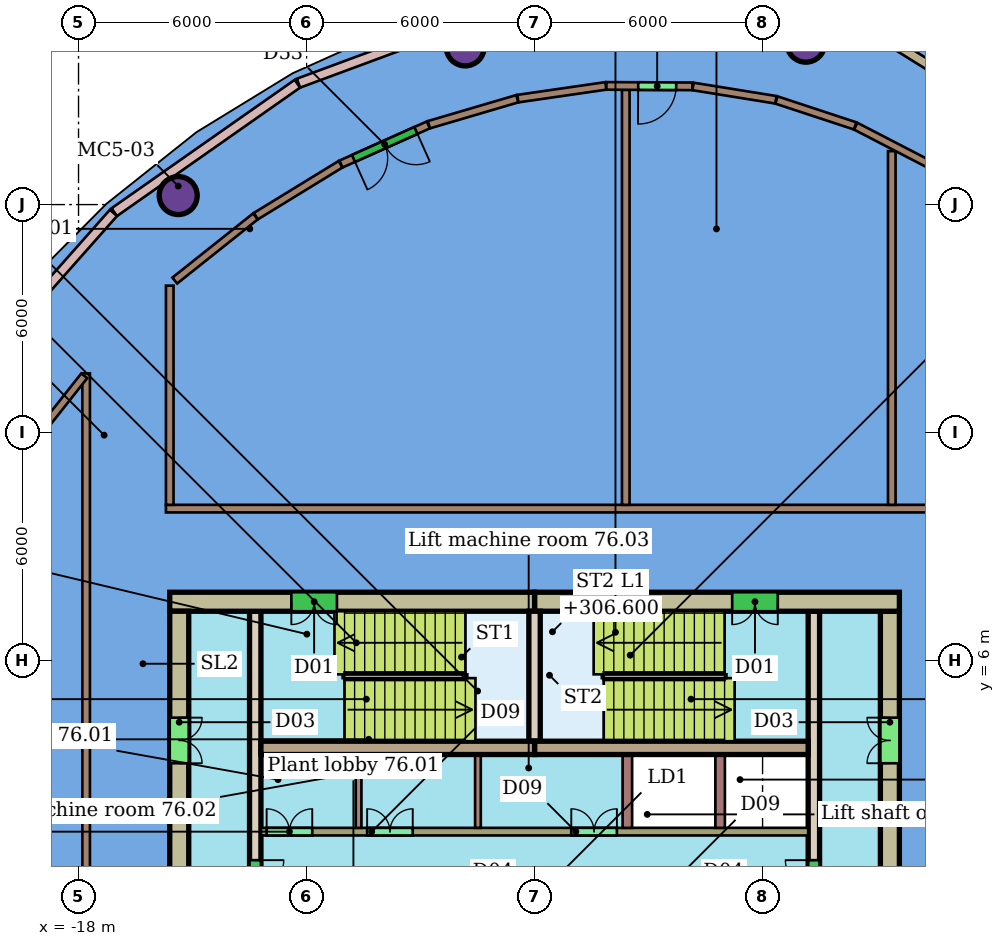
"""IFC4 building model, lengths in metres.
Left out: names, types, materials, properties, quantities, classifications, styles, units other than length and angle.
Written with IfcOpenShell. Run it as: python <this file> out.ifc"""

import sys

from ifc_helpers import new_model, si_unit, direction, frame, frame_2d, origin, origin_2d, place, context, subcontext, project, spatial, rectangle, hollow_circle, extrude, element, fill, save


model = new_model("IFC4")
c1 = context("Model", 3, precision=1e-05, world=origin(), true_north=direction((0.0, 1.0)))
c2 = subcontext(c1, "Body", "Model", "MODEL_VIEW")
j1 = project(units=[si_unit("LENGTHUNIT", "METRE"), si_unit("PLANEANGLEUNIT", "RADIAN")], contexts=[c1])
p1 = place(None, origin())
s1 = spatial("IfcSite", under=j1, at=p1, CompositionType="ELEMENT")
p2 = place(p1, origin())
s2 = spatial("IfcBuilding", under=s1, at=p2, CompositionType="ELEMENT")
p3 = place(p2, frame((0.0, 0.0, 304.5)))
s3 = spatial("IfcBuildingStorey", under=s2, at=p3, CompositionType="ELEMENT", Elevation=304.5)
for number, where, z_axis, x_axis in (
    (1, (1.138, 22.247, 0.0), (0.0, 0.0, 1.0), (1.0, 0.0, 0.0)),
    (2, (-7.825, 22.149, 0.0), (0.0, 0.0, 1.0), (1.0, 0.0, 0.0)),
    (3, (-15.377, 18.238, 0.0), (0.0, 0.0, 1.0), (1.0, 0.0, 0.0)),
):
    element("IfcColumn", number, at=place(p3, frame(where, z_axis=z_axis, x_axis=x_axis)), inside=s3, PredefinedType="COLUMN", context=c2, shape_type="SweptSolid", body=[
        extrude(hollow_circle(Radius=0.5, WallThickness=0.04, at=origin_2d()), origin(), (0.0, 0.0, 1.0), 4.0),
    ])
p4 = place(p3, frame((-15.7, 10.0, 0.0), z_axis=(0.0, 0.0, 1.0), x_axis=(1.0, 0.0, 0.0)))
e4 = element("IfcWall", 4, at=p4, inside=s3, PredefinedType="PARTITIONING", context=c2, shape_type="SweptSolid", body=[
    extrude(rectangle(XDim=21.4, YDim=0.2, at=frame_2d((10.7, 0.0))), origin(), (0.0, 0.0, 1.0), 3.65),
])
p5 = place(p3, frame((-17.8, -10.1, 0.0), z_axis=(0.0, 0.0, 1.0), x_axis=(0.0, 1.0, 0.0)))
e5 = element("IfcWall", 5, at=p5, inside=s3, PredefinedType="PARTITIONING", context=c2, shape_type="SweptSolid", body=[
    extrude(rectangle(XDim=23.658, YDim=0.2, at=frame_2d((11.829, 0.0))), origin(), (0.0, 0.0, 1.0), 3.65),
])
p6 = place(p3, frame((-15.6, 10.1, 0.0), z_axis=(0.0, 0.0, 1.0), x_axis=(0.0, 1.0, 0.0)))
e6 = element("IfcWall", 6, at=p6, inside=s3, PredefinedType="PARTITIONING", context=c2, shape_type="SweptSolid", body=[
    extrude(rectangle(XDim=5.767, YDim=0.2, at=frame_2d((2.884, 0.0))), origin(), (0.0, 0.0, 1.0), 3.65),
])
p7 = place(p3, frame((-3.6, 10.1, 0.0), z_axis=(0.0, 0.0, 1.0), x_axis=(0.0, 1.0, 0.0)))
e7 = element("IfcWall", 7, at=p7, inside=s3, PredefinedType="PARTITIONING", context=c2, shape_type="SweptSolid", body=[
    extrude(rectangle(XDim=10.92, YDim=0.2, at=frame_2d((5.46, 0.0))), origin(), (0.0, 0.0, 1.0), 3.65),
])
p8 = place(p3, frame((-15.468, 16.001, 0.0), z_axis=(0.0, 0.0, 1.0), x_axis=(0.782665833332, 0.62244212047, 0.0)))
e8 = element("IfcWall", 8, at=p8, inside=s3, PredefinedType="PARTITIONING", context=c2, shape_type="SweptSolid", body=[
    extrude(rectangle(XDim=2.712, YDim=0.2, at=frame_2d((1.356, 0.0))), origin(), (0.0, 0.0, 1.0), 3.65),
])
p9 = place(p3, frame((-13.334, 17.696, 0.0), z_axis=(0.0, 0.0, 1.0), x_axis=(0.852667029926, 0.522454721557, 0.0)))
e9 = element("IfcWall", 9, at=p9, inside=s3, PredefinedType="PARTITIONING", context=c2, shape_type="SweptSolid", body=[
    extrude(rectangle(XDim=2.614, YDim=0.2, at=frame_2d((1.307, 0.0))), origin(), (0.0, 0.0, 1.0), 3.65),
])
p10 = place(p3, frame((-8.794, 20.097, 0.0), z_axis=(0.0, 0.0, 1.0), x_axis=(-0.912552955942, -0.408958558538, 0.0)))
e10 = element("IfcWall", 10, at=p10, inside=s3, PredefinedType="PARTITIONING", context=c2, shape_type="SweptSolid", body=[
    extrude(rectangle(XDim=2.521, YDim=0.2, at=frame_2d((1.26, 0.0))), origin(), (0.0, 0.0, 1.0), 3.65),
])
p11 = place(p10, frame((0.36, 0.0, 0.0)))
e11 = element("IfcOpeningElement", 11, at=p11, cuts=e10, PredefinedType="OPENING", context=c2, shape_type="SweptSolid", body=[
    extrude(rectangle(XDim=1.8, YDim=2.4, at=frame_2d((0.9, 1.2))), frame((0.0, 0.11, 0.0), z_axis=(0.0, -1.0, 0.0), x_axis=(1.0, 0.0, 0.0)), (0.0, 0.0, 1.0), 0.22),
])
p12 = place(p3, frame((-8.781, 20.101, 0.0), z_axis=(0.0, 0.0, 1.0), x_axis=(0.95934146389, 0.28224803925, 0.0)))
e12 = element("IfcWall", 12, at=p12, inside=s3, PredefinedType="PARTITIONING", context=c2, shape_type="SweptSolid", body=[
    extrude(rectangle(XDim=2.426, YDim=0.2, at=frame_2d((1.213, 0.0))), origin(), (0.0, 0.0, 1.0), 3.65),
])
p13 = place(p3, frame((-6.439, 20.788, 0.0), z_axis=(0.0, 0.0, 1.0), x_axis=(0.989671979467, 0.143350525141, 0.0)))
e13 = element("IfcWall", 13, at=p13, inside=s3, PredefinedType="PARTITIONING", context=c2, shape_type="SweptSolid", body=[
    extrude(rectangle(XDim=2.338, YDim=0.2, at=frame_2d((1.169, 0.0))), origin(), (0.0, 0.0, 1.0), 3.65),
])
p14 = place(p3, frame((-1.846, 21.111, 0.0), z_axis=(0.0, 0.0, 1.0), x_axis=(-0.999986603133, 0.005176248997, 0.0)))
e14 = element("IfcWall", 14, at=p14, inside=s3, PredefinedType="PARTITIONING", context=c2, shape_type="SweptSolid", body=[
    extrude(rectangle(XDim=2.264, YDim=0.2, at=frame_2d((1.132, 0.0))), origin(), (0.0, 0.0, 1.0), 3.65),
])
p15 = place(p14, frame((0.427, 0.0, 0.0)))
e15 = element("IfcOpeningElement", 15, at=p15, cuts=e14, PredefinedType="OPENING", context=c2, shape_type="SweptSolid", body=[
    extrude(rectangle(XDim=1.0, YDim=2.1, at=frame_2d((0.5, 1.05))), frame((0.0, 0.11, 0.0), z_axis=(0.0, -1.0, 0.0), x_axis=(1.0, 0.0, 0.0)), (0.0, 0.0, 1.0), 0.22),
])
p16 = place(p3, frame((3.4, 10.1, 0.0), z_axis=(0.0, 0.0, 1.0), x_axis=(0.0, 1.0, 0.0)))
e16 = element("IfcWall", 16, at=p16, inside=s3, PredefinedType="PARTITIONING", context=c2, shape_type="SweptSolid", body=[
    extrude(rectangle(XDim=9.307, YDim=0.2, at=frame_2d((4.654, 0.0))), origin(), (0.0, 0.0, 1.0), 3.65),
])
p17 = place(p3, frame((-1.831, 21.109, 0.0), z_axis=(0.0, 0.0, 1.0), x_axis=(0.987257926423, -0.159128208423, 0.0)))
e17 = element("IfcWall", 17, at=p17, inside=s3, PredefinedType="PARTITIONING", context=c2, shape_type="SweptSolid", body=[
    extrude(rectangle(XDim=2.209, YDim=0.2, at=frame_2d((1.104, 0.0))), origin(), (0.0, 0.0, 1.0), 3.65),
])
p18 = place(p3, frame((0.365, 20.752, 0.0), z_axis=(0.0, 0.0, 1.0), x_axis=(0.949852302688, -0.312698901627, 0.0)))
e18 = element("IfcWall", 18, at=p18, inside=s3, PredefinedType="PARTITIONING", context=c2, shape_type="SweptSolid", body=[
    extrude(rectangle(XDim=2.181, YDim=0.2, at=frame_2d((1.09, 0.0))), origin(), (0.0, 0.0, 1.0), 3.65),
])
p19 = place(p3, frame((2.451, 20.063, 0.0), z_axis=(0.0, 0.0, 1.0), x_axis=(0.888068415533, -0.45971131086, 0.0)))
e19 = element("IfcWall", 19, at=p19, inside=s3, PredefinedType="PARTITIONING", context=c2, shape_type="SweptSolid", body=[
    extrude(rectangle(XDim=2.165, YDim=0.2, at=frame_2d((1.082, 0.0))), origin(), (0.0, 0.0, 1.0), 3.65),
])
p20 = place(p3, frame((-19.191, 11.799, 0.0), z_axis=(0.0, 0.0, 1.0), x_axis=(0.620321195124, 0.784347891487, 0.0)))
e20 = element("IfcWall", 20, at=p20, inside=s3, PredefinedType="PARTITIONING", context=c2, shape_type="SweptSolid", body=[
    extrude(rectangle(XDim=2.163, YDim=0.2, at=frame_2d((1.081, 0.0))), origin(), (0.0, 0.0, 1.0), 3.65),
])
p21 = place(p3, frame((-6.983, 23.131, 0.0), z_axis=(0.0, 0.0, 1.0), x_axis=(-0.937764073403, -0.34727300879, 0.0)))
e21 = element("IfcWall", 21, at=p21, inside=s3, PredefinedType="SOLIDWALL", context=c2, shape_type="SweptSolid", body=[
    extrude(rectangle(XDim=5.577, YDim=0.25, at=frame_2d((2.789, 0.0))), origin(), (0.0, 0.0, 1.0), 3.7),
])
p22 = place(p3, frame((-12.241, 21.18, 0.0), z_axis=(0.0, 0.0, 1.0), x_axis=(-0.818761962214, -0.574133128492, 0.0)))
e22 = element("IfcWall", 22, at=p22, inside=s3, PredefinedType="SOLIDWALL", context=c2, shape_type="SweptSolid", body=[
    extrude(rectangle(XDim=5.885, YDim=0.25, at=frame_2d((2.943, 0.0))), origin(), (0.0, 0.0, 1.0), 3.7),
])
p23 = place(p3, frame((-17.081, 17.781, 0.0), z_axis=(0.0, 0.0, 1.0), x_axis=(-0.663232601491, -0.748413332537, 0.0)))
e23 = element("IfcWall", 23, at=p23, inside=s3, PredefinedType="SOLIDWALL", context=c2, shape_type="SweptSolid", body=[
    extrude(rectangle(XDim=6.139, YDim=0.25, at=frame_2d((3.07, 0.0))), origin(), (0.0, 0.0, 1.0), 3.7),
])
p24 = place(p3, frame((7.737, 19.57, 0.0), z_axis=(0.0, 0.0, 1.0), x_axis=(-0.84872546146, 0.528833708333, 0.0)))
e24 = element("IfcWall", 24, at=p24, inside=s3, PredefinedType="SOLIDWALL", context=c2, shape_type="SweptSolid", body=[
    extrude(rectangle(XDim=5.125, YDim=0.25, at=frame_2d((2.562, 0.0))), origin(), (0.0, 0.0, 1.0), 4.0),
])
p25 = place(p3, frame((3.6, 7.55, 0.0), z_axis=(0.0, 0.0, 1.0), x_axis=(-1.0, 0.0, 0.0)))
e25 = element("IfcWall", 25, at=p25, inside=s3, PredefinedType="SHEAR", context=c2, shape_type="SweptSolid", body=[
    extrude(rectangle(XDim=9.6, YDim=0.5, at=frame_2d((4.8, 0.0))), origin(), (0.0, 0.0, 1.0), 3.9),
])
p26 = place(p25, frame((3.2, 0.0, 0.0)))
e26 = element("IfcOpeningElement", 26, at=p26, cuts=e25, PredefinedType="OPENING", context=c2, shape_type="SweptSolid", body=[
    extrude(rectangle(XDim=1.2, YDim=2.1, at=frame_2d((0.6, 1.05))), frame((0.0, 0.26, 0.0), z_axis=(0.0, -1.0, 0.0), x_axis=(1.0, 0.0, 0.0)), (0.0, 0.0, 1.0), 0.52),
])
p27 = place(p3, frame((-6.0, 7.55, 0.0), z_axis=(0.0, 0.0, 1.0), x_axis=(-1.0, 0.0, 0.0)))
e27 = element("IfcWall", 27, at=p27, inside=s3, PredefinedType="SHEAR", context=c2, shape_type="SweptSolid", body=[
    extrude(rectangle(XDim=9.6, YDim=0.5, at=frame_2d((4.8, 0.0))), origin(), (0.0, 0.0, 1.0), 3.9),
])
p28 = place(p27, frame((5.2, 0.0, 0.0)))
e28 = element("IfcOpeningElement", 28, at=p28, cuts=e27, PredefinedType="OPENING", context=c2, shape_type="SweptSolid", body=[
    extrude(rectangle(XDim=1.2, YDim=2.1, at=frame_2d((0.6, 1.05))), frame((0.0, 0.26, 0.0), z_axis=(0.0, -1.0, 0.0), x_axis=(1.0, 0.0, 0.0)), (0.0, 0.0, 1.0), 0.52),
])
p29 = place(p3, frame((-15.35, 7.3, 0.0), z_axis=(0.0, 0.0, 1.0), x_axis=(0.0, -1.0, 0.0)))
e29 = element("IfcWall", 29, at=p29, inside=s3, PredefinedType="SHEAR", context=c2, shape_type="SweptSolid", body=[
    extrude(rectangle(XDim=14.6, YDim=0.5, at=frame_2d((7.3, 0.0))), origin(), (0.0, 0.0, 1.0), 3.9),
])
p30 = place(p29, frame((10.6, 0.0, 0.0)))
e30 = element("IfcOpeningElement", 30, at=p30, cuts=e29, PredefinedType="OPENING", context=c2, shape_type="SweptSolid", body=[
    extrude(rectangle(XDim=1.2, YDim=2.1, at=frame_2d((0.6, 1.05))), frame((0.0, 0.26, 0.0), z_axis=(0.0, -1.0, 0.0), x_axis=(1.0, 0.0, 0.0)), (0.0, 0.0, 1.0), 0.52),
])
p31 = place(p29, frame((2.8, 0.0, 0.0)))
e31 = element("IfcOpeningElement", 31, at=p31, cuts=e29, PredefinedType="OPENING", context=c2, shape_type="SweptSolid", body=[
    extrude(rectangle(XDim=1.2, YDim=2.1, at=frame_2d((0.6, 1.05))), frame((0.0, 0.26, 0.0), z_axis=(0.0, -1.0, 0.0), x_axis=(1.0, 0.0, 0.0)), (0.0, 0.0, 1.0), 0.52),
])
p32 = place(p3, frame((3.35, -7.3, 0.0), z_axis=(0.0, 0.0, 1.0), x_axis=(0.0, 1.0, 0.0)))
e32 = element("IfcWall", 32, at=p32, inside=s3, PredefinedType="SHEAR", context=c2, shape_type="SweptSolid", body=[
    extrude(rectangle(XDim=14.6, YDim=0.5, at=frame_2d((7.3, 0.0))), origin(), (0.0, 0.0, 1.0), 3.9),
])
p33 = place(p32, frame((2.8, 0.0, 0.0)))
e33 = element("IfcOpeningElement", 33, at=p33, cuts=e32, PredefinedType="OPENING", context=c2, shape_type="SweptSolid", body=[
    extrude(rectangle(XDim=1.2, YDim=2.1, at=frame_2d((0.6, 1.05))), frame((0.0, 0.26, 0.0), z_axis=(0.0, -1.0, 0.0), x_axis=(1.0, 0.0, 0.0)), (0.0, 0.0, 1.0), 0.52),
])
p34 = place(p32, frame((10.6, 0.0, 0.0)))
e34 = element("IfcOpeningElement", 34, at=p34, cuts=e32, PredefinedType="OPENING", context=c2, shape_type="SweptSolid", body=[
    extrude(rectangle(XDim=1.2, YDim=2.1, at=frame_2d((0.6, 1.05))), frame((0.0, 0.26, 0.0), z_axis=(0.0, -1.0, 0.0), x_axis=(1.0, 0.0, 0.0)), (0.0, 0.0, 1.0), 0.52),
])
for number, where, z_axis, x_axis in (
    (35, (-13.2, 3.705, 0.0), (0.0, 0.0, 1.0), (1.0, 0.0, 0.0)),
    (36, (-6.0, 3.705, 0.0), (0.0, 0.0, 1.0), (1.0, 0.0, 0.0)),
):
    element("IfcWall", number, at=place(p3, frame(where, z_axis=z_axis, x_axis=x_axis)), inside=s3, PredefinedType="SHEAR", context=c2, shape_type="SweptSolid", body=[
        extrude(rectangle(XDim=7.2, YDim=0.35, at=frame_2d((3.6, 0.0))), origin(), (0.0, 0.0, 1.0), 3.9),
    ])
p35 = place(p3, frame((-13.35, 7.3, 0.0), z_axis=(0.0, 0.0, 1.0), x_axis=(0.0, -1.0, 0.0)))
e37 = element("IfcWall", 37, at=p35, inside=s3, PredefinedType="SHEAR", context=c2, shape_type="SweptSolid", body=[
    extrude(rectangle(XDim=14.6, YDim=0.3, at=frame_2d((7.3, 0.0))), origin(), (0.0, 0.0, 1.0), 3.9),
])
p36 = place(p35, frame((6.55, 0.0, 0.0)))
e38 = element("IfcOpeningElement", 38, at=p36, cuts=e37, PredefinedType="OPENING", context=c2, shape_type="SweptSolid", body=[
    extrude(rectangle(XDim=1.5, YDim=2.1, at=frame_2d((0.75, 1.05))), frame((0.0, 0.16, 0.0), z_axis=(0.0, -1.0, 0.0), x_axis=(1.0, 0.0, 0.0)), (0.0, 0.0, 1.0), 0.32),
])
p37 = place(p3, frame((1.35, -7.3, 0.0), z_axis=(0.0, 0.0, 1.0), x_axis=(0.0, 1.0, 0.0)))
e39 = element("IfcWall", 39, at=p37, inside=s3, PredefinedType="SHEAR", context=c2, shape_type="SweptSolid", body=[
    extrude(rectangle(XDim=14.6, YDim=0.3, at=frame_2d((7.3, 0.0))), origin(), (0.0, 0.0, 1.0), 3.9),
])
p38 = place(p37, frame((1.21, 0.0, 0.0)))
e40 = element("IfcOpeningElement", 40, at=p38, cuts=e39, PredefinedType="OPENING", context=c2, shape_type="SweptSolid", body=[
    extrude(rectangle(XDim=1.0, YDim=2.1, at=frame_2d((0.5, 1.05))), frame((0.0, 0.16, 0.0), z_axis=(0.0, -1.0, 0.0), x_axis=(1.0, 0.0, 0.0)), (0.0, 0.0, 1.0), 0.32),
])
p39 = place(p37, frame((6.55, 0.0, 0.0)))
e41 = element("IfcOpeningElement", 41, at=p39, cuts=e39, PredefinedType="OPENING", context=c2, shape_type="SweptSolid", body=[
    extrude(rectangle(XDim=1.5, YDim=2.1, at=frame_2d((0.75, 1.05))), frame((0.0, 0.16, 0.0), z_axis=(0.0, -1.0, 0.0), x_axis=(1.0, 0.0, 0.0)), (0.0, 0.0, 1.0), 0.32),
])
p40 = place(p3, frame((-13.2, 1.5, 0.0), z_axis=(0.0, 0.0, 1.0), x_axis=(1.0, 0.0, 0.0)))
e42 = element("IfcWall", 42, at=p40, inside=s3, PredefinedType="SHEAR", context=c2, shape_type="SweptSolid", body=[
    extrude(rectangle(XDim=14.4, YDim=0.2, at=frame_2d((7.2, 0.0))), origin(), (0.0, 0.0, 1.0), 3.9),
])
p41 = place(p40, frame((0.15, 0.0, 0.0)))
e43 = element("IfcOpeningElement", 43, at=p41, cuts=e42, PredefinedType="OPENING", context=c2, shape_type="SweptSolid", body=[
    extrude(rectangle(XDim=1.2, YDim=2.4, at=frame_2d((0.6, 1.2))), frame((0.0, 0.11, 0.0), z_axis=(0.0, -1.0, 0.0), x_axis=(1.0, 0.0, 0.0)), (0.0, 0.0, 1.0), 0.22),
])
p42 = place(p40, frame((2.794, 0.0, 0.0)))
e44 = element("IfcOpeningElement", 44, at=p42, cuts=e42, PredefinedType="OPENING", context=c2, shape_type="SweptSolid", body=[
    extrude(rectangle(XDim=1.2, YDim=2.4, at=frame_2d((0.6, 1.2))), frame((0.0, 0.11, 0.0), z_axis=(0.0, -1.0, 0.0), x_axis=(1.0, 0.0, 0.0)), (0.0, 0.0, 1.0), 0.22),
])
p43 = place(p40, frame((8.167, 0.0, 0.0)))
e45 = element("IfcOpeningElement", 45, at=p43, cuts=e42, PredefinedType="OPENING", context=c2, shape_type="SweptSolid", body=[
    extrude(rectangle(XDim=1.2, YDim=2.4, at=frame_2d((0.6, 1.2))), frame((0.0, 0.11, 0.0), z_axis=(0.0, -1.0, 0.0), x_axis=(1.0, 0.0, 0.0)), (0.0, 0.0, 1.0), 0.22),
])
p44 = place(p3, frame((-6.0, 3.88, 0.0), z_axis=(0.0, 0.0, 1.0), x_axis=(0.0, 1.0, 0.0)))
e46 = element("IfcWall", 46, at=p44, inside=s3, PredefinedType="SHEAR", context=c2, shape_type="SweptSolid", body=[
    extrude(rectangle(XDim=3.42, YDim=0.3, at=frame_2d((1.71, 0.0))), origin(), (0.0, 0.0, 1.0), 3.9),
])
for number, where, z_axis, x_axis in (
    (47, (-3.558, 1.6, 0.0), (0.0, 0.0, 1.0), (0.0, 1.0, 0.0)),
    (48, (-1.117, 1.6, 0.0), (0.0, 0.0, 1.0), (0.0, 1.0, 0.0)),
):
    element("IfcWall", number, at=place(p3, frame(where, z_axis=z_axis, x_axis=x_axis)), inside=s3, PredefinedType="SHEAR", context=c2, shape_type="SweptSolid", body=[
        extrude(rectangle(XDim=1.93, YDim=0.25, at=frame_2d((0.965, 0.0))), origin(), (0.0, 0.0, 1.0), 3.9),
    ])
for number, where, z_axis, x_axis in (
    (49, (-10.631, 1.6, 0.0), (0.0, 0.0, 1.0), (0.0, 1.0, 0.0)),
    (50, (-7.49, 1.6, 0.0), (0.0, 0.0, 1.0), (0.0, 1.0, 0.0)),
):
    element("IfcWall", number, at=place(p3, frame(where, z_axis=z_axis, x_axis=x_axis)), inside=s3, PredefinedType="PARTITIONING", context=c2, shape_type="SweptSolid", body=[
        extrude(rectangle(XDim=1.93, YDim=0.15, at=frame_2d((0.965, 0.0))), origin(), (0.0, 0.0, 1.0), 3.9),
    ])
p45 = place(p11, origin())
e51 = element("IfcDoor", 51, at=p45, inside=s3, OperationType="DOUBLE_DOOR_SINGLE_SWING", PredefinedType="DOOR", context=c2, shape_type="SweptSolid", body=[
    extrude(rectangle(XDim=1.8, YDim=2.4, at=frame_2d((0.9, 1.2))), frame((0.0, 0.025, 0.0), z_axis=(0.0, -1.0, 0.0), x_axis=(1.0, 0.0, 0.0)), (0.0, 0.0, 1.0), 0.05),
])
fill(e11, e51)
p46 = place(p15, origin())
e52 = element("IfcDoor", 52, at=p46, inside=s3, OperationType="SINGLE_SWING_RIGHT", PredefinedType="DOOR", context=c2, shape_type="SweptSolid", body=[
    extrude(rectangle(XDim=1.0, YDim=2.1, at=frame_2d((0.5, 1.05))), frame((0.0, 0.025, 0.0), z_axis=(0.0, -1.0, 0.0), x_axis=(1.0, 0.0, 0.0)), (0.0, 0.0, 1.0), 0.05),
])
fill(e15, e52)
p47 = place(p26, origin())
e53 = element("IfcDoor", 53, at=p47, inside=s3, OperationType="DOUBLE_DOOR_SINGLE_SWING", PredefinedType="NOTDEFINED", context=c2, shape_type="SweptSolid", body=[
    extrude(rectangle(XDim=1.2, YDim=2.1, at=frame_2d((0.6, 1.05))), frame((0.0, 0.025, 0.0), z_axis=(0.0, -1.0, 0.0), x_axis=(1.0, 0.0, 0.0)), (0.0, 0.0, 1.0), 0.05),
])
fill(e26, e53)
p48 = place(p28, origin())
e54 = element("IfcDoor", 54, at=p48, inside=s3, OperationType="DOUBLE_DOOR_SINGLE_SWING", PredefinedType="NOTDEFINED", context=c2, shape_type="SweptSolid", body=[
    extrude(rectangle(XDim=1.2, YDim=2.1, at=frame_2d((0.6, 1.05))), frame((0.0, 0.025, 0.0), z_axis=(0.0, -1.0, 0.0), x_axis=(1.0, 0.0, 0.0)), (0.0, 0.0, 1.0), 0.05),
])
fill(e28, e54)
p49 = place(p31, origin())
e55 = element("IfcDoor", 55, at=p49, inside=s3, OperationType="DOUBLE_DOOR_SINGLE_SWING", PredefinedType="NOTDEFINED", context=c2, shape_type="SweptSolid", body=[
    extrude(rectangle(XDim=1.2, YDim=2.1, at=frame_2d((0.6, 1.05))), frame((0.0, 0.025, 0.0), z_axis=(0.0, -1.0, 0.0), x_axis=(1.0, 0.0, 0.0)), (0.0, 0.0, 1.0), 0.05),
])
fill(e31, e55)
p50 = place(p34, origin())
e56 = element("IfcDoor", 56, at=p50, inside=s3, OperationType="DOUBLE_DOOR_SINGLE_SWING", PredefinedType="NOTDEFINED", context=c2, shape_type="SweptSolid", body=[
    extrude(rectangle(XDim=1.2, YDim=2.1, at=frame_2d((0.6, 1.05))), frame((0.0, 0.025, 0.0), z_axis=(0.0, -1.0, 0.0), x_axis=(1.0, 0.0, 0.0)), (0.0, 0.0, 1.0), 0.05),
])
fill(e34, e56)
p51 = place(p36, origin())
e57 = element("IfcDoor", 57, at=p51, inside=s3, OperationType="DOUBLE_DOOR_SINGLE_SWING", PredefinedType="NOTDEFINED", context=c2, shape_type="SweptSolid", body=[
    extrude(rectangle(XDim=1.5, YDim=2.1, at=frame_2d((0.75, 1.05))), frame((0.0, 0.025, 0.0), z_axis=(0.0, -1.0, 0.0), x_axis=(1.0, 0.0, 0.0)), (0.0, 0.0, 1.0), 0.05),
])
fill(e38, e57)
p52 = place(p39, origin())
e58 = element("IfcDoor", 58, at=p52, inside=s3, OperationType="DOUBLE_DOOR_SINGLE_SWING", PredefinedType="NOTDEFINED", context=c2, shape_type="SweptSolid", body=[
    extrude(rectangle(XDim=1.5, YDim=2.1, at=frame_2d((0.75, 1.05))), frame((0.0, 0.025, 0.0), z_axis=(0.0, -1.0, 0.0), x_axis=(1.0, 0.0, 0.0)), (0.0, 0.0, 1.0), 0.05),
])
fill(e41, e58)
p53 = place(p41, origin())
e59 = element("IfcDoor", 59, at=p53, inside=s3, OperationType="DOUBLE_DOOR_SINGLE_SWING", PredefinedType="NOTDEFINED", context=c2, shape_type="SweptSolid", body=[
    extrude(rectangle(XDim=1.2, YDim=2.4, at=frame_2d((0.6, 1.2))), frame((0.0, 0.025, 0.0), z_axis=(0.0, -1.0, 0.0), x_axis=(1.0, 0.0, 0.0)), (0.0, 0.0, 1.0), 0.05),
])
fill(e43, e59)
p54 = place(p42, origin())
e60 = element("IfcDoor", 60, at=p54, inside=s3, OperationType="DOUBLE_DOOR_SINGLE_SWING", PredefinedType="NOTDEFINED", context=c2, shape_type="SweptSolid", body=[
    extrude(rectangle(XDim=1.2, YDim=2.4, at=frame_2d((0.6, 1.2))), frame((0.0, 0.025, 0.0), z_axis=(0.0, -1.0, 0.0), x_axis=(1.0, 0.0, 0.0)), (0.0, 0.0, 1.0), 0.05),
])
fill(e44, e60)
p55 = place(p43, origin())
e61 = element("IfcDoor", 61, at=p55, inside=s3, OperationType="DOUBLE_DOOR_SINGLE_SWING", PredefinedType="NOTDEFINED", context=c2, shape_type="SweptSolid", body=[
    extrude(rectangle(XDim=1.2, YDim=2.4, at=frame_2d((0.6, 1.2))), frame((0.0, 0.025, 0.0), z_axis=(0.0, -1.0, 0.0), x_axis=(1.0, 0.0, 0.0)), (0.0, 0.0, 1.0), 0.05),
])
fill(e45, e61)
save(model, sys.argv[1])
